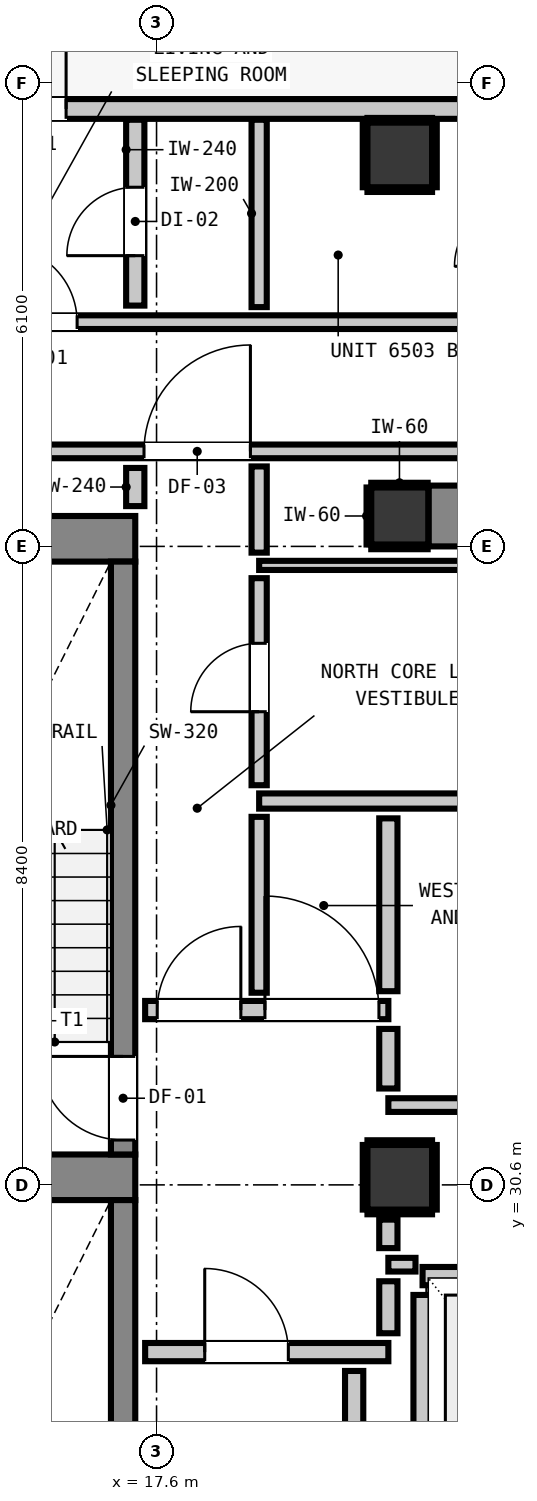
"""IFC4 building model, lengths in metres.
Left out: names, types, materials, properties, quantities, classifications, styles, units other than length and angle.
Written with IfcOpenShell. Run it as: python <this file> out.ifc"""

import sys

from ifc_helpers import new_model, si_unit, direction, frame, frame_2d, origin, origin_2d, place, context, subcontext, project, spatial, rectangle, extrude, element, fill, save


model = new_model("IFC4")
c1 = context("Model", 3, precision=1e-05, world=origin(), true_north=direction((0.0, 1.0)))
c2 = subcontext(c1, "Body", "Model", "MODEL_VIEW")
j1 = project(units=[si_unit("LENGTHUNIT", "METRE"), si_unit("PLANEANGLEUNIT", "RADIAN")], contexts=[c1])
p1 = place(None, origin())
s1 = spatial("IfcSite", under=j1, at=p1, CompositionType="ELEMENT")
p2 = place(p1, origin())
s2 = spatial("IfcBuilding", under=s1, at=p2, CompositionType="ELEMENT")
p3 = place(p2, frame((0.0, 0.0, 223.36)))
s3 = spatial("IfcBuildingStorey", under=s2, at=p3, CompositionType="ELEMENT", Elevation=223.36)
p4 = place(p3, frame((20.8, 39.4, 0.0), z_axis=(0.0, 0.0, 1.0), x_axis=(1.0, 0.0, 0.0)))
e1 = element("IfcColumn", 1, at=p4, inside=s3, PredefinedType="COLUMN", context=c2, shape_type="SweptSolid", body=[
    extrude(rectangle(XDim=0.75, YDim=0.75, at=origin_2d()), origin(), (0.0, 0.0, 1.0), 3.32),
])
p5 = place(p3, frame((13.24, 39.1, 0.0), z_axis=(0.0, 0.0, 1.0), x_axis=(1.0, 0.0, 0.0)))
e2 = element("IfcWall", 2, at=p5, inside=s3, PredefinedType="SHEAR", context=c2, shape_type="SweptSolid", body=[
    extrude(rectangle(XDim=4.08, YDim=0.6, at=frame_2d((2.04, 0.0))), origin(), (0.0, 0.0, 1.0), 3.32),
])
p6 = place(p3, frame((13.78, 30.7, 0.0), z_axis=(0.0, 0.0, 1.0), x_axis=(1.0, 0.0, 0.0)))
e3 = element("IfcWall", 3, at=p6, inside=s3, PredefinedType="SHEAR", context=c2, shape_type="SweptSolid", body=[
    extrude(rectangle(XDim=3.54, YDim=0.6, at=frame_2d((1.77, 0.0))), origin(), (0.0, 0.0, 1.0), 3.32),
])
p7 = place(p3, frame((21.18, 39.4, 0.0), z_axis=(0.0, 0.0, 1.0), x_axis=(1.0, 0.0, 0.0)))
e4 = element("IfcWall", 4, at=p7, inside=s3, PredefinedType="SHEAR", context=c2, shape_type="SweptSolid", body=[
    extrude(rectangle(XDim=7.64, YDim=0.8, at=frame_2d((3.82, 0.0))), origin(), (0.0, 0.0, 1.0), 3.32),
])
p8 = place(p3, frame((17.16, 31.0, 0.0), z_axis=(0.0, 0.0, 1.0), x_axis=(0.0, 1.0, 0.0)))
e5 = element("IfcWall", 5, at=p8, inside=s3, PredefinedType="SHEAR", context=c2, shape_type="SweptSolid", body=[
    extrude(rectangle(XDim=7.8, YDim=0.32, at=frame_2d((3.9, 0.0))), origin(), (0.0, 0.0, 1.0), 3.32),
])
p9 = place(p8, frame((0.19, 0.0, 0.0)))
e6 = element("IfcOpeningElement", 6, at=p9, cuts=e5, PredefinedType="OPENING", context=c2, shape_type="SweptSolid", body=[
    extrude(rectangle(XDim=1.1, YDim=2.15, at=frame_2d((0.55, 1.075))), frame((0.0, 0.17, 0.0), z_axis=(0.0, -1.0, 0.0), x_axis=(1.0, 0.0, 0.0)), (0.0, 0.0, 1.0), 0.34),
])
p10 = place(p3, frame((17.16, 22.4, 0.0), z_axis=(0.0, 0.0, 1.0), x_axis=(0.0, 1.0, 0.0)))
e7 = element("IfcWall", 7, at=p10, inside=s3, PredefinedType="SHEAR", context=c2, shape_type="SweptSolid", body=[
    extrude(rectangle(XDim=8.0, YDim=0.32, at=frame_2d((4.0, 0.0))), origin(), (0.0, 0.0, 1.0), 3.32),
])
p11 = place(p10, frame((0.39, 0.0, 0.0)))
e8 = element("IfcOpeningElement", 8, at=p11, cuts=e7, PredefinedType="OPENING", context=c2, shape_type="SweptSolid", body=[
    extrude(rectangle(XDim=1.1, YDim=2.15, at=frame_2d((0.55, 1.075))), frame((0.0, 0.17, 0.0), z_axis=(0.0, -1.0, 0.0), x_axis=(1.0, 0.0, 0.0)), (0.0, 0.0, 1.0), 0.34),
])
for number, where, z_axis, x_axis in (
    (9, (20.8, 30.7, 0.0), (0.0, 0.0, 1.0), (1.0, 0.0, 0.0)),
    (10, (20.8, 44.15, 0.0), (0.0, 0.0, 1.0), (1.0, 0.0, 0.0)),
):
    element("IfcColumn", number, at=place(p3, frame(where, z_axis=z_axis, x_axis=x_axis)), inside=s3, PredefinedType="COLUMN", context=c2, shape_type="SweptSolid", body=[
        extrude(rectangle(XDim=0.85, YDim=0.85, at=origin_2d()), origin(), (0.0, 0.0, 1.0), 3.32),
    ])
p12 = place(p3, frame((12.745, 44.755, 0.0), z_axis=(0.0, 0.0, 1.0), x_axis=(1.0, 0.0, 0.0)))
e11 = element("IfcWall", 11, at=p12, inside=s3, PredefinedType="STANDARD", context=c2, shape_type="SweptSolid", body=[
    extrude(rectangle(XDim=32.71, YDim=0.26, at=frame_2d((16.355, 0.0))), origin(), (0.0, 0.0, 1.0), 2.92),
])
p13 = place(p12, frame((2.665, 0.0, 0.0)))
e12 = element("IfcOpeningElement", 12, at=p13, cuts=e11, PredefinedType="OPENING", context=c2, shape_type="SweptSolid", body=[
    extrude(rectangle(XDim=1.0, YDim=2.15, at=frame_2d((0.5, 1.075))), frame((0.0, 0.14, 0.0), z_axis=(0.0, -1.0, 0.0), x_axis=(1.0, 0.0, 0.0)), (0.0, 0.0, 1.0), 0.28),
])
p14 = place(p12, frame((10.605, 0.0, 0.85)))
e13 = element("IfcOpeningElement", 13, at=p14, cuts=e11, PredefinedType="OPENING", context=c2, shape_type="SweptSolid", body=[
    extrude(rectangle(XDim=1.05, YDim=1.65, at=frame_2d((0.525, 0.825))), frame((0.0, 0.14, 0.0), z_axis=(0.0, -1.0, 0.0), x_axis=(1.0, 0.0, 0.0)), (0.0, 0.0, 1.0), 0.28),
])
p15 = place(p12, frame((18.585, 0.0, 0.85)))
e14 = element("IfcOpeningElement", 14, at=p15, cuts=e11, PredefinedType="OPENING", context=c2, shape_type="SweptSolid", body=[
    extrude(rectangle(XDim=1.05, YDim=1.65, at=frame_2d((0.525, 0.825))), frame((0.0, 0.14, 0.0), z_axis=(0.0, -1.0, 0.0), x_axis=(1.0, 0.0, 0.0)), (0.0, 0.0, 1.0), 0.28),
])
p16 = place(p12, frame((28.395, 0.0, 0.85)))
e15 = element("IfcOpeningElement", 15, at=p16, cuts=e11, PredefinedType="OPENING", context=c2, shape_type="SweptSolid", body=[
    extrude(rectangle(XDim=1.05, YDim=1.65, at=frame_2d((0.525, 0.825))), frame((0.0, 0.14, 0.0), z_axis=(0.0, -1.0, 0.0), x_axis=(1.0, 0.0, 0.0)), (0.0, 0.0, 1.0), 0.28),
])
p17 = place(p3, frame((21.1, 29.4, 0.0), z_axis=(0.0, 0.0, 1.0), x_axis=(1.0, 0.0, 0.0)))
e16 = element("IfcWall", 16, at=p17, inside=s3, PredefinedType="PARTITIONING", context=c2, shape_type="SweptSolid", body=[
    extrude(rectangle(XDim=2.2, YDim=0.24, at=frame_2d((1.1, 0.0))), origin(), (0.0, 0.0, 1.0), 2.92),
])
p18 = place(p3, frame((21.1, 27.048, 0.0), z_axis=(0.0, 0.0, 1.0), x_axis=(0.0, 1.0, 0.0)))
e17 = element("IfcWall", 17, at=p18, inside=s3, PredefinedType="PARTITIONING", context=c2, shape_type="SweptSolid", body=[
    extrude(rectangle(XDim=2.104, YDim=0.24, at=frame_2d((1.052, 0.0))), origin(), (0.0, 0.0, 1.0), 1.849),
])
p19 = place(p3, frame((17.45, 28.4, 0.0), z_axis=(0.0, 0.0, 1.0), x_axis=(1.0, 0.0, 0.0)))
e18 = element("IfcWall", 18, at=p19, inside=s3, PredefinedType="PARTITIONING", context=c2, shape_type="SweptSolid", body=[
    extrude(rectangle(XDim=3.2, YDim=0.24, at=frame_2d((1.6, 0.0))), origin(), (0.0, 0.0, 1.0), 2.92),
])
p20 = place(p19, frame((0.784, 0.0, 0.0)))
e19 = element("IfcOpeningElement", 19, at=p20, cuts=e18, PredefinedType="OPENING", context=c2, shape_type="SweptSolid", body=[
    extrude(rectangle(XDim=1.1, YDim=2.15, at=frame_2d((0.55, 1.075))), frame((0.0, 0.13, 0.0), z_axis=(0.0, -1.0, 0.0), x_axis=(1.0, 0.0, 0.0)), (0.0, 0.0, 1.0), 0.26),
])
p21 = place(p3, frame((17.45, 32.9, 0.0), z_axis=(0.0, 0.0, 1.0), x_axis=(1.0, 0.0, 0.0)))
e20 = element("IfcWall", 20, at=p21, inside=s3, PredefinedType="PARTITIONING", context=c2, shape_type="SweptSolid", body=[
    extrude(rectangle(XDim=3.2, YDim=0.24, at=frame_2d((1.6, 0.0))), origin(), (0.0, 0.0, 1.0), 2.92),
])
p22 = place(p21, frame((0.159, 0.0, 0.0)))
e21 = element("IfcOpeningElement", 21, at=p22, cuts=e20, PredefinedType="OPENING", context=c2, shape_type="SweptSolid", body=[
    extrude(rectangle(XDim=1.1, YDim=2.15, at=frame_2d((0.55, 1.075))), frame((0.0, 0.13, 0.0), z_axis=(0.0, -1.0, 0.0), x_axis=(1.0, 0.0, 0.0)), (0.0, 0.0, 1.0), 0.26),
])
p23 = place(p21, frame((1.576, 0.0, 0.0)))
e22 = element("IfcOpeningElement", 22, at=p23, cuts=e20, PredefinedType="OPENING", context=c2, shape_type="SweptSolid", body=[
    extrude(rectangle(XDim=1.5, YDim=2.15, at=frame_2d((0.75, 1.075))), frame((0.0, 0.13, 0.0), z_axis=(0.0, -1.0, 0.0), x_axis=(1.0, 0.0, 0.0)), (0.0, 0.0, 1.0), 0.26),
])
p24 = place(p3, frame((18.95, 35.65, 0.0), z_axis=(0.0, 0.0, 1.0), x_axis=(1.0, 0.0, 0.0)))
e23 = element("IfcWall", 23, at=p24, inside=s3, PredefinedType="PARTITIONING", context=c2, shape_type="SweptSolid", body=[
    extrude(rectangle(XDim=11.025, YDim=0.2, at=frame_2d((5.513, 0.0))), origin(), (0.0, 0.0, 1.0), 2.92),
])
p25 = place(p3, frame((20.65, 29.55, 0.0), z_axis=(0.0, 0.0, 1.0), x_axis=(1.0, 0.0, 0.0)))
e24 = element("IfcWall", 24, at=p25, inside=s3, PredefinedType="PARTITIONING", context=c2, shape_type="SweptSolid", body=[
    extrude(rectangle(XDim=0.357, YDim=0.18, at=frame_2d((0.179, 0.0))), origin(), (0.0, 0.0, 1.0), 2.92),
])
p26 = place(p3, frame((20.65, 31.65, 0.0), z_axis=(0.0, 0.0, 1.0), x_axis=(1.0, 0.0, 0.0)))
e25 = element("IfcWall", 25, at=p26, inside=s3, PredefinedType="PARTITIONING", context=c2, shape_type="SweptSolid", body=[
    extrude(rectangle(XDim=7.7, YDim=0.18, at=frame_2d((3.85, 0.0))), origin(), (0.0, 0.0, 1.0), 2.92),
])
p27 = place(p26, frame((4.673, 0.0, 0.0)))
e26 = element("IfcOpeningElement", 26, at=p27, cuts=e25, PredefinedType="OPENING", context=c2, shape_type="SweptSolid", body=[
    extrude(rectangle(XDim=0.9, YDim=2.1, at=frame_2d((0.45, 1.05))), frame((0.0, 0.1, 0.0), z_axis=(0.0, -1.0, 0.0), x_axis=(1.0, 0.0, 0.0)), (0.0, 0.0, 1.0), 0.2),
])
p28 = place(p3, frame((10.787, 40.25, 0.0), z_axis=(0.0, 0.0, 1.0), x_axis=(1.0, 0.0, 0.0)))
e27 = element("IfcWall", 27, at=p28, inside=s3, PredefinedType="PARTITIONING", context=c2, shape_type="SweptSolid", body=[
    extrude(rectangle(XDim=26.102, YDim=0.18, at=frame_2d((13.051, 0.0))), origin(), (0.0, 0.0, 1.0), 2.92),
])
p29 = place(p28, frame((6.648, 0.0, 0.0)))
e28 = element("IfcOpeningElement", 28, at=p29, cuts=e27, PredefinedType="OPENING", context=c2, shape_type="SweptSolid", body=[
    extrude(rectangle(XDim=1.4, YDim=2.15, at=frame_2d((0.7, 1.075))), frame((0.0, 0.1, 0.0), z_axis=(0.0, -1.0, 0.0), x_axis=(1.0, 0.0, 0.0)), (0.0, 0.0, 1.0), 0.2),
])
p30 = place(p3, frame((10.787, 41.95, 0.0), z_axis=(0.0, 0.0, 1.0), x_axis=(1.0, 0.0, 0.0)))
e29 = element("IfcWall", 29, at=p30, inside=s3, PredefinedType="PARTITIONING", context=c2, shape_type="SweptSolid", body=[
    extrude(rectangle(XDim=26.102, YDim=0.18, at=frame_2d((13.051, 0.0))), origin(), (0.0, 0.0, 1.0), 2.92),
])
p31 = place(p30, frame((4.768, 0.0, 0.0)))
e30 = element("IfcOpeningElement", 30, at=p31, cuts=e29, PredefinedType="OPENING", context=c2, shape_type="SweptSolid", body=[
    extrude(rectangle(XDim=1.0, YDim=2.15, at=frame_2d((0.5, 1.075))), frame((0.0, 0.1, 0.0), z_axis=(0.0, -1.0, 0.0), x_axis=(1.0, 0.0, 0.0)), (0.0, 0.0, 1.0), 0.2),
])
p32 = place(p30, frame((12.588, 0.0, 0.0)))
e31 = element("IfcOpeningElement", 31, at=p32, cuts=e29, PredefinedType="OPENING", context=c2, shape_type="SweptSolid", body=[
    extrude(rectangle(XDim=1.0, YDim=2.15, at=frame_2d((0.5, 1.075))), frame((0.0, 0.1, 0.0), z_axis=(0.0, -1.0, 0.0), x_axis=(1.0, 0.0, 0.0)), (0.0, 0.0, 1.0), 0.2),
])
p33 = place(p30, frame((20.568, 0.0, 0.0)))
e32 = element("IfcOpeningElement", 32, at=p33, cuts=e29, PredefinedType="OPENING", context=c2, shape_type="SweptSolid", body=[
    extrude(rectangle(XDim=1.0, YDim=2.15, at=frame_2d((0.5, 1.075))), frame((0.0, 0.1, 0.0), z_axis=(0.0, -1.0, 0.0), x_axis=(1.0, 0.0, 0.0)), (0.0, 0.0, 1.0), 0.2),
])
p34 = place(p3, frame((18.95, 38.75, 0.0), z_axis=(0.0, 0.0, 1.0), x_axis=(1.0, 0.0, 0.0)))
e33 = element("IfcWall", 33, at=p34, inside=s3, PredefinedType="PARTITIONING", context=c2, shape_type="SweptSolid", body=[
    extrude(rectangle(XDim=13.56, YDim=0.12, at=frame_2d((6.78, 0.0))), origin(), (0.0, 0.0, 1.0), 2.92),
])
p35 = place(p3, frame((17.32, 39.53, 0.0), z_axis=(0.0, 0.0, 1.0), x_axis=(0.0, 1.0, 0.0)))
e34 = element("IfcWall", 34, at=p35, inside=s3, PredefinedType="PARTITIONING", context=c2, shape_type="SweptSolid", body=[
    extrude(rectangle(XDim=0.502, YDim=0.24, at=frame_2d((0.251, 0.0))), origin(), (0.0, 0.0, 1.0), 2.92),
])
p36 = place(p3, frame((17.32, 42.168, 0.0), z_axis=(0.0, 0.0, 1.0), x_axis=(0.0, 1.0, 0.0)))
e35 = element("IfcWall", 35, at=p36, inside=s3, PredefinedType="PARTITIONING", context=c2, shape_type="SweptSolid", body=[
    extrude(rectangle(XDim=2.445, YDim=0.24, at=frame_2d((1.223, 0.0))), origin(), (0.0, 0.0, 1.0), 2.92),
])
p37 = place(p36, frame((0.657, 0.0, 0.0)))
e36 = element("IfcOpeningElement", 36, at=p37, cuts=e35, PredefinedType="OPENING", context=c2, shape_type="SweptSolid", body=[
    extrude(rectangle(XDim=0.9, YDim=2.1, at=frame_2d((0.45, 1.05))), frame((0.0, 0.13, 0.0), z_axis=(0.0, -1.0, 0.0), x_axis=(1.0, 0.0, 0.0)), (0.0, 0.0, 1.0), 0.26),
])
p38 = place(p3, frame((20.2, 21.398, 0.0), z_axis=(0.0, 0.0, 1.0), x_axis=(0.0, 1.0, 0.0)))
e37 = element("IfcWall", 37, at=p38, inside=s3, PredefinedType="PARTITIONING", context=c2, shape_type="SweptSolid", body=[
    extrude(rectangle(XDim=6.754, YDim=0.24, at=frame_2d((3.377, 0.0))), origin(), (0.0, 0.0, 1.0), 2.92),
])
p39 = place(p3, frame((20.65, 28.648, 0.0), z_axis=(0.0, 0.0, 1.0), x_axis=(0.0, 1.0, 0.0)))
e38 = element("IfcWall", 38, at=p39, inside=s3, PredefinedType="PARTITIONING", context=c2, shape_type="SweptSolid", body=[
    extrude(rectangle(XDim=0.684, YDim=0.24, at=frame_2d((0.342, 0.0))), origin(), (0.0, 0.0, 1.0), 1.849),
])
p40 = place(p3, frame((20.65, 29.768, 0.0), z_axis=(0.0, 0.0, 1.0), x_axis=(0.0, 1.0, 0.0)))
e39 = element("IfcWall", 39, at=p40, inside=s3, PredefinedType="PARTITIONING", context=c2, shape_type="SweptSolid", body=[
    extrude(rectangle(XDim=0.375, YDim=0.24, at=frame_2d((0.188, 0.0))), origin(), (0.0, 0.0, 1.0), 1.849),
])
p41 = place(p3, frame((20.65, 31.868, 0.0), z_axis=(0.0, 0.0, 1.0), x_axis=(0.0, 1.0, 0.0)))
e40 = element("IfcWall", 40, at=p41, inside=s3, PredefinedType="PARTITIONING", context=c2, shape_type="SweptSolid", body=[
    extrude(rectangle(XDim=0.784, YDim=0.24, at=frame_2d((0.392, 0.0))), origin(), (0.0, 0.0, 1.0), 1.849),
])
p42 = place(p3, frame((20.65, 33.148, 0.0), z_axis=(0.0, 0.0, 1.0), x_axis=(0.0, 1.0, 0.0)))
e41 = element("IfcWall", 41, at=p42, inside=s3, PredefinedType="PARTITIONING", context=c2, shape_type="SweptSolid", body=[
    extrude(rectangle(XDim=2.274, YDim=0.24, at=frame_2d((1.137, 0.0))), origin(), (0.0, 0.0, 1.0), 1.849),
])
p43 = place(p3, frame((18.95, 33.128, 0.0), z_axis=(0.0, 0.0, 1.0), x_axis=(0.0, 1.0, 0.0)))
e42 = element("IfcWall", 42, at=p43, inside=s3, PredefinedType="PARTITIONING", context=c2, shape_type="SweptSolid", body=[
    extrude(rectangle(XDim=2.314, YDim=0.2, at=frame_2d((1.157, 0.0))), origin(), (0.0, 0.0, 1.0), 2.92),
])
p44 = place(p3, frame((18.95, 35.858, 0.0), z_axis=(0.0, 0.0, 1.0), x_axis=(0.0, 1.0, 0.0)))
e43 = element("IfcWall", 43, at=p44, inside=s3, PredefinedType="PARTITIONING", context=c2, shape_type="SweptSolid", body=[
    extrude(rectangle(XDim=2.724, YDim=0.2, at=frame_2d((1.362, 0.0))), origin(), (0.0, 0.0, 1.0), 2.92),
])
p45 = place(p44, frame((0.967, 0.0, 0.0)))
e44 = element("IfcOpeningElement", 44, at=p45, cuts=e43, PredefinedType="OPENING", context=c2, shape_type="SweptSolid", body=[
    extrude(rectangle(XDim=0.9, YDim=2.1, at=frame_2d((0.45, 1.05))), frame((0.0, 0.11, 0.0), z_axis=(0.0, -1.0, 0.0), x_axis=(1.0, 0.0, 0.0)), (0.0, 0.0, 1.0), 0.22),
])
p46 = place(p3, frame((18.95, 38.918, 0.0), z_axis=(0.0, 0.0, 1.0), x_axis=(0.0, 1.0, 0.0)))
e45 = element("IfcWall", 45, at=p46, inside=s3, PredefinedType="PARTITIONING", context=c2, shape_type="SweptSolid", body=[
    extrude(rectangle(XDim=1.134, YDim=0.2, at=frame_2d((0.567, 0.0))), origin(), (0.0, 0.0, 1.0), 2.92),
])
p47 = place(p3, frame((18.95, 42.148, 0.0), z_axis=(0.0, 0.0, 1.0), x_axis=(0.0, 1.0, 0.0)))
e46 = element("IfcWall", 46, at=p47, inside=s3, PredefinedType="PARTITIONING", context=c2, shape_type="SweptSolid", body=[
    extrude(rectangle(XDim=2.465, YDim=0.2, at=frame_2d((1.232, 0.0))), origin(), (0.0, 0.0, 1.0), 2.92),
])
for number, where, z_axis, x_axis in (
    (47, (20.425, 38.993, 0.0), (0.0, 0.0, 1.0), (1.0, 0.0, 0.0)),
    (48, (20.425, 39.807, 0.0), (0.0, 0.0, 1.0), (1.0, 0.0, 0.0)),
):
    element("IfcWall", number, at=place(p3, frame(where, z_axis=z_axis, x_axis=x_axis)), inside=s3, PredefinedType="PARTITIONING", context=c2, shape_type="SweptSolid", body=[
        extrude(rectangle(XDim=0.742, YDim=0.06, at=frame_2d((0.371, 0.0))), origin(), (0.0, 0.0, 1.0), 1.45),
    ])
p48 = place(p3, frame((20.393, 39.025, 0.0), z_axis=(0.0, 0.0, 1.0), x_axis=(0.0, 1.0, 0.0)))
e49 = element("IfcWall", 49, at=p48, inside=s3, PredefinedType="PARTITIONING", context=c2, shape_type="SweptSolid", body=[
    extrude(rectangle(XDim=0.75, YDim=0.06, at=frame_2d((0.375, 0.0))), origin(), (0.0, 0.0, 1.0), 1.45),
])
for number, where, z_axis, x_axis in (
    (50, (20.375, 30.243, 0.0), (0.0, 0.0, 1.0), (1.0, 0.0, 0.0)),
    (51, (20.375, 31.157, 0.0), (0.0, 0.0, 1.0), (1.0, 0.0, 0.0)),
    (52, (20.343, 30.275, 0.0), (0.0, 0.0, 1.0), (0.0, 1.0, 0.0)),
    (53, (21.257, 30.275, 0.0), (0.0, 0.0, 1.0), (0.0, 1.0, 0.0)),
    (54, (20.375, 43.693, 0.0), (0.0, 0.0, 1.0), (1.0, 0.0, 0.0)),
    (55, (20.375, 44.607, 0.0), (0.0, 0.0, 1.0), (1.0, 0.0, 0.0)),
):
    element("IfcWall", number, at=place(p3, frame(where, z_axis=z_axis, x_axis=x_axis)), inside=s3, PredefinedType="PARTITIONING", context=c2, shape_type="SweptSolid", body=[
        extrude(rectangle(XDim=0.85, YDim=0.06, at=frame_2d((0.425, 0.0))), origin(), (0.0, 0.0, 1.0), 1.45),
    ])
for number, where, z_axis, x_axis in (
    (56, (20.343, 43.725, 0.0), (0.0, 0.0, 1.0), (0.0, 1.0, 0.0)),
    (57, (21.257, 43.725, 0.0), (0.0, 0.0, 1.0), (0.0, 1.0, 0.0)),
):
    element("IfcWall", number, at=place(p3, frame(where, z_axis=z_axis, x_axis=x_axis)), inside=s3, PredefinedType="PARTITIONING", context=c2, shape_type="SweptSolid", body=[
        extrude(rectangle(XDim=0.85, YDim=0.06, at=frame_2d((0.425, 0.0))), origin(), (0.0, 0.0, 1.0), 1.45),
    ])
p49 = place(p13, origin())
e58 = element("IfcDoor", 58, at=p49, inside=s3, OperationType="SINGLE_SWING_RIGHT", PredefinedType="DOOR", context=c2, shape_type="SweptSolid", body=[
    extrude(rectangle(XDim=1.0, YDim=2.15, at=frame_2d((0.5, 1.075))), frame((0.0, 0.025, 0.0), z_axis=(0.0, -1.0, 0.0), x_axis=(1.0, 0.0, 0.0)), (0.0, 0.0, 1.0), 0.05),
])
fill(e12, e58)
p50 = place(p9, origin())
e59 = element("IfcDoor", 59, at=p50, inside=s3, OperationType="SINGLE_SWING_RIGHT", PredefinedType="DOOR", context=c2, shape_type="SweptSolid", body=[
    extrude(rectangle(XDim=1.1, YDim=2.15, at=frame_2d((0.55, 1.075))), frame((0.0, 0.025, 0.0), z_axis=(0.0, -1.0, 0.0), x_axis=(1.0, 0.0, 0.0)), (0.0, 0.0, 1.0), 0.05),
])
fill(e6, e59)
p51 = place(p20, origin())
e60 = element("IfcDoor", 60, at=p51, inside=s3, OperationType="SINGLE_SWING_LEFT", PredefinedType="DOOR", context=c2, shape_type="SweptSolid", body=[
    extrude(rectangle(XDim=1.1, YDim=2.15, at=frame_2d((0.55, 1.075))), frame((0.0, 0.025, 0.0), z_axis=(0.0, -1.0, 0.0), x_axis=(1.0, 0.0, 0.0)), (0.0, 0.0, 1.0), 0.05),
])
fill(e19, e60)
p52 = place(p22, origin())
e61 = element("IfcDoor", 61, at=p52, inside=s3, OperationType="SINGLE_SWING_RIGHT", PredefinedType="DOOR", context=c2, shape_type="SweptSolid", body=[
    extrude(rectangle(XDim=1.1, YDim=2.15, at=frame_2d((0.55, 1.075))), frame((0.0, 0.025, 0.0), z_axis=(0.0, -1.0, 0.0), x_axis=(1.0, 0.0, 0.0)), (0.0, 0.0, 1.0), 0.05),
])
fill(e21, e61)
p53 = place(p29, origin())
e62 = element("IfcDoor", 62, at=p53, inside=s3, OperationType="SINGLE_SWING_RIGHT", PredefinedType="DOOR", context=c2, shape_type="SweptSolid", body=[
    extrude(rectangle(XDim=1.4, YDim=2.15, at=frame_2d((0.7, 1.075))), frame((0.0, 0.025, 0.0), z_axis=(0.0, -1.0, 0.0), x_axis=(1.0, 0.0, 0.0)), (0.0, 0.0, 1.0), 0.05),
])
fill(e28, e62)
p54 = place(p23, origin())
e63 = element("IfcDoor", 63, at=p54, inside=s3, OperationType="SINGLE_SWING_LEFT", PredefinedType="DOOR", context=c2, shape_type="SweptSolid", body=[
    extrude(rectangle(XDim=1.5, YDim=2.15, at=frame_2d((0.75, 1.075))), frame((0.0, 0.025, 0.0), z_axis=(0.0, -1.0, 0.0), x_axis=(1.0, 0.0, 0.0)), (0.0, 0.0, 1.0), 0.05),
])
fill(e22, e63)
p55 = place(p45, origin())
e64 = element("IfcDoor", 64, at=p55, inside=s3, OperationType="SINGLE_SWING_LEFT", PredefinedType="DOOR", context=c2, shape_type="SweptSolid", body=[
    extrude(rectangle(XDim=0.9, YDim=2.1, at=frame_2d((0.45, 1.05))), frame((0.0, 0.025, 0.0), z_axis=(0.0, -1.0, 0.0), x_axis=(1.0, 0.0, 0.0)), (0.0, 0.0, 1.0), 0.05),
])
fill(e44, e64)
p56 = place(p31, origin())
e65 = element("IfcDoor", 65, at=p56, inside=s3, OperationType="SINGLE_SWING_LEFT", PredefinedType="DOOR", context=c2, shape_type="SweptSolid", body=[
    extrude(rectangle(XDim=1.0, YDim=2.15, at=frame_2d((0.5, 1.075))), frame((0.0, 0.025, 0.0), z_axis=(0.0, -1.0, 0.0), x_axis=(1.0, 0.0, 0.0)), (0.0, 0.0, 1.0), 0.05),
])
fill(e30, e65)
p57 = place(p37, origin())
e66 = element("IfcDoor", 66, at=p57, inside=s3, OperationType="SINGLE_SWING_LEFT", PredefinedType="DOOR", context=c2, shape_type="SweptSolid", body=[
    extrude(rectangle(XDim=0.9, YDim=2.1, at=frame_2d((0.45, 1.05))), frame((0.0, 0.025, 0.0), z_axis=(0.0, -1.0, 0.0), x_axis=(1.0, 0.0, 0.0)), (0.0, 0.0, 1.0), 0.05),
])
fill(e36, e66)
save(model, sys.argv[1])
